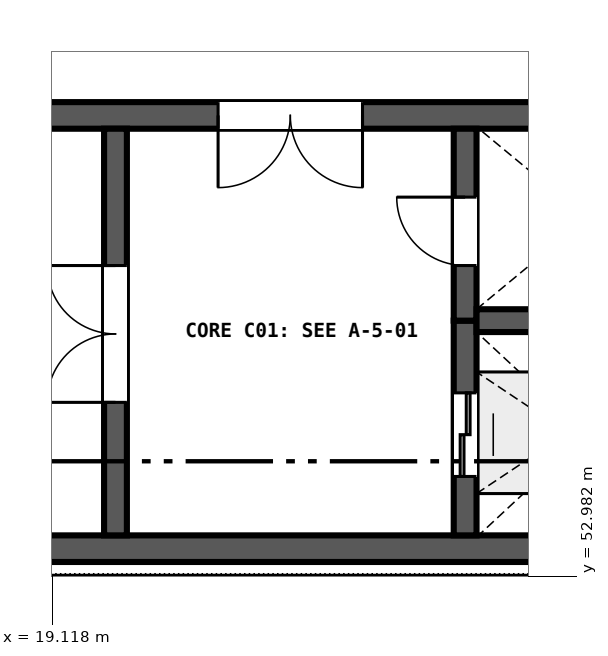
"""IFC4 building model, lengths in metres.
Left out: names, types, materials, properties, quantities, classifications, styles, units other than length and angle.
Written with IfcOpenShell. Run it as: python <this file> out.ifc"""

import sys

from ifc_helpers import new_model, si_unit, direction, frame, frame_2d, origin, place, context, subcontext, project, spatial, rectangle, extrude, element, fill, save


model = new_model("IFC4")
c1 = context("Model", 3, precision=1e-05, world=origin(), true_north=direction((0.0, 1.0)))
c2 = subcontext(c1, "Body", "Model", "MODEL_VIEW")
j1 = project(units=[si_unit("LENGTHUNIT", "METRE"), si_unit("PLANEANGLEUNIT", "RADIAN")], contexts=[c1])
p1 = place(None, origin())
s1 = spatial("IfcSite", under=j1, at=p1, CompositionType="ELEMENT")
p2 = place(p1, origin())
s2 = spatial("IfcBuilding", under=s1, at=p2, CompositionType="ELEMENT")
p3 = place(p2, frame((0.0, 0.0, 4.8)))
s3 = spatial("IfcBuildingStorey", under=s2, at=p3, CompositionType="ELEMENT", Elevation=4.8)
p4 = place(p3, frame((9.9, 53.35, 0.0), z_axis=(0.0, 0.0, 1.0), x_axis=(1.0, 0.0, 0.0)))
e1 = element("IfcWall", 1, at=p4, inside=s3, PredefinedType="SHEAR", context=c2, shape_type="SweptSolid", body=[
    extrude(rectangle(XDim=18.0, YDim=0.35, at=frame_2d((9.0, 0.0))), origin(), (0.0, 0.0, 1.0), 4.52),
])
p5 = place(p3, frame((27.9, 59.05, 0.0), z_axis=(0.0, 0.0, 1.0), x_axis=(-1.0, 0.0, 0.0)))
e2 = element("IfcWall", 2, at=p5, inside=s3, PredefinedType="SHEAR", context=c2, shape_type="SweptSolid", body=[
    extrude(rectangle(XDim=18.0, YDim=0.35, at=frame_2d((9.0, 0.0))), origin(), (0.0, 0.0, 1.0), 4.52),
])
p6 = place(p5, frame((4.7, 0.0, 0.0)))
e3 = element("IfcOpeningElement", 3, at=p6, cuts=e2, PredefinedType="OPENING", context=c2, shape_type="SweptSolid", body=[
    extrude(rectangle(XDim=1.9, YDim=2.25, at=frame_2d((0.95, 1.125))), frame((0.0, 0.185, 0.0), z_axis=(0.0, -1.0, 0.0), x_axis=(1.0, 0.0, 0.0)), (0.0, 0.0, 1.0), 0.37),
])
p7 = place(p3, frame((19.95, 53.525, 0.0), z_axis=(0.0, 0.0, 1.0), x_axis=(0.0, 1.0, 0.0)))
e4 = element("IfcWall", 4, at=p7, inside=s3, PredefinedType="SHEAR", context=c2, shape_type="SweptSolid", body=[
    extrude(rectangle(XDim=5.35, YDim=0.3, at=frame_2d((2.675, 0.0))), origin(), (0.0, 0.0, 1.0), 4.52),
])
p8 = place(p7, frame((1.75, 0.0, 0.0)))
e5 = element("IfcOpeningElement", 5, at=p8, cuts=e4, PredefinedType="OPENING", context=c2, shape_type="SweptSolid", body=[
    extrude(rectangle(XDim=1.8, YDim=2.25, at=frame_2d((0.9, 1.125))), frame((0.0, 0.16, 0.0), z_axis=(0.0, -1.0, 0.0), x_axis=(1.0, 0.0, 0.0)), (0.0, 0.0, 1.0), 0.32),
])
p9 = place(p3, frame((24.55, 53.525, 0.0), z_axis=(0.0, 0.0, 1.0), x_axis=(0.0, 1.0, 0.0)))
e6 = element("IfcWall", 6, at=p9, inside=s3, PredefinedType="SHEAR", context=c2, shape_type="SweptSolid", body=[
    extrude(rectangle(XDim=2.825, YDim=0.3, at=frame_2d((1.413, 0.0))), origin(), (0.0, 0.0, 1.0), 4.52),
])
p10 = place(p9, frame((0.775, 0.0, 0.0)))
e7 = element("IfcOpeningElement", 7, at=p10, cuts=e6, PredefinedType="OPENING", context=c2, shape_type="SweptSolid", body=[
    extrude(rectangle(XDim=1.1, YDim=2.1, at=frame_2d((0.55, 1.05))), frame((0.0, 0.16, 0.0), z_axis=(0.0, -1.0, 0.0), x_axis=(1.0, 0.0, 0.0)), (0.0, 0.0, 1.0), 0.32),
])
p11 = place(p3, frame((24.55, 56.35, 0.0), z_axis=(0.0, 0.0, 1.0), x_axis=(0.0, 1.0, 0.0)))
e8 = element("IfcWall", 8, at=p11, inside=s3, PredefinedType="SHEAR", context=c2, shape_type="SweptSolid", body=[
    extrude(rectangle(XDim=2.525, YDim=0.3, at=frame_2d((1.262, 0.0))), origin(), (0.0, 0.0, 1.0), 4.52),
])
p12 = place(p11, frame((0.725, 0.0, 0.0)))
e9 = element("IfcOpeningElement", 9, at=p12, cuts=e8, PredefinedType="OPENING", context=c2, shape_type="SweptSolid", body=[
    extrude(rectangle(XDim=0.9, YDim=2.1, at=frame_2d((0.45, 1.05))), frame((0.0, 0.16, 0.0), z_axis=(0.0, -1.0, 0.0), x_axis=(1.0, 0.0, 0.0)), (0.0, 0.0, 1.0), 0.32),
])
p13 = place(p3, frame((24.7, 56.35, 0.0), z_axis=(0.0, 0.0, 1.0), x_axis=(1.0, 0.0, 0.0)))
e10 = element("IfcWall", 10, at=p13, inside=s3, PredefinedType="SHEAR", context=c2, shape_type="SweptSolid", body=[
    extrude(rectangle(XDim=2.875, YDim=0.3, at=frame_2d((1.438, 0.0))), origin(), (0.0, 0.0, 1.0), 4.52),
])
p14 = place(p8, origin())
e11 = element("IfcDoor", 11, at=p14, inside=s3, OperationType="DOUBLE_DOOR_SINGLE_SWING", PredefinedType="DOOR", context=c2, shape_type="SweptSolid", body=[
    extrude(rectangle(XDim=1.8, YDim=2.25, at=frame_2d((0.9, 1.125))), frame((0.0, 0.025, 0.0), z_axis=(0.0, -1.0, 0.0), x_axis=(1.0, 0.0, 0.0)), (0.0, 0.0, 1.0), 0.05),
])
fill(e5, e11)
p15 = place(p12, origin())
e12 = element("IfcDoor", 12, at=p15, inside=s3, OperationType="SINGLE_SWING_RIGHT", PredefinedType="DOOR", context=c2, shape_type="SweptSolid", body=[
    extrude(rectangle(XDim=0.9, YDim=2.1, at=frame_2d((0.45, 1.05))), frame((0.0, 0.025, 0.0), z_axis=(0.0, -1.0, 0.0), x_axis=(1.0, 0.0, 0.0)), (0.0, 0.0, 1.0), 0.05),
])
fill(e9, e12)
p16 = place(p10, origin())
e13 = element("IfcDoor", 13, at=p16, inside=s3, OperationType="DOUBLE_DOOR_SLIDING", PredefinedType="DOOR", context=c2, shape_type="SweptSolid", body=[
    extrude(rectangle(XDim=1.1, YDim=2.1, at=frame_2d((0.55, 1.05))), frame((0.0, 0.025, 0.0), z_axis=(0.0, -1.0, 0.0), x_axis=(1.0, 0.0, 0.0)), (0.0, 0.0, 1.0), 0.05),
])
fill(e7, e13)
p17 = place(p6, origin())
e14 = element("IfcDoor", 14, at=p17, inside=s3, OperationType="DOUBLE_DOOR_SINGLE_SWING", PredefinedType="DOOR", context=c2, shape_type="SweptSolid", body=[
    extrude(rectangle(XDim=1.9, YDim=2.25, at=frame_2d((0.95, 1.125))), frame((0.0, 0.025, 0.0), z_axis=(0.0, -1.0, 0.0), x_axis=(1.0, 0.0, 0.0)), (0.0, 0.0, 1.0), 0.05),
])
fill(e3, e14)
save(model, sys.argv[1])
